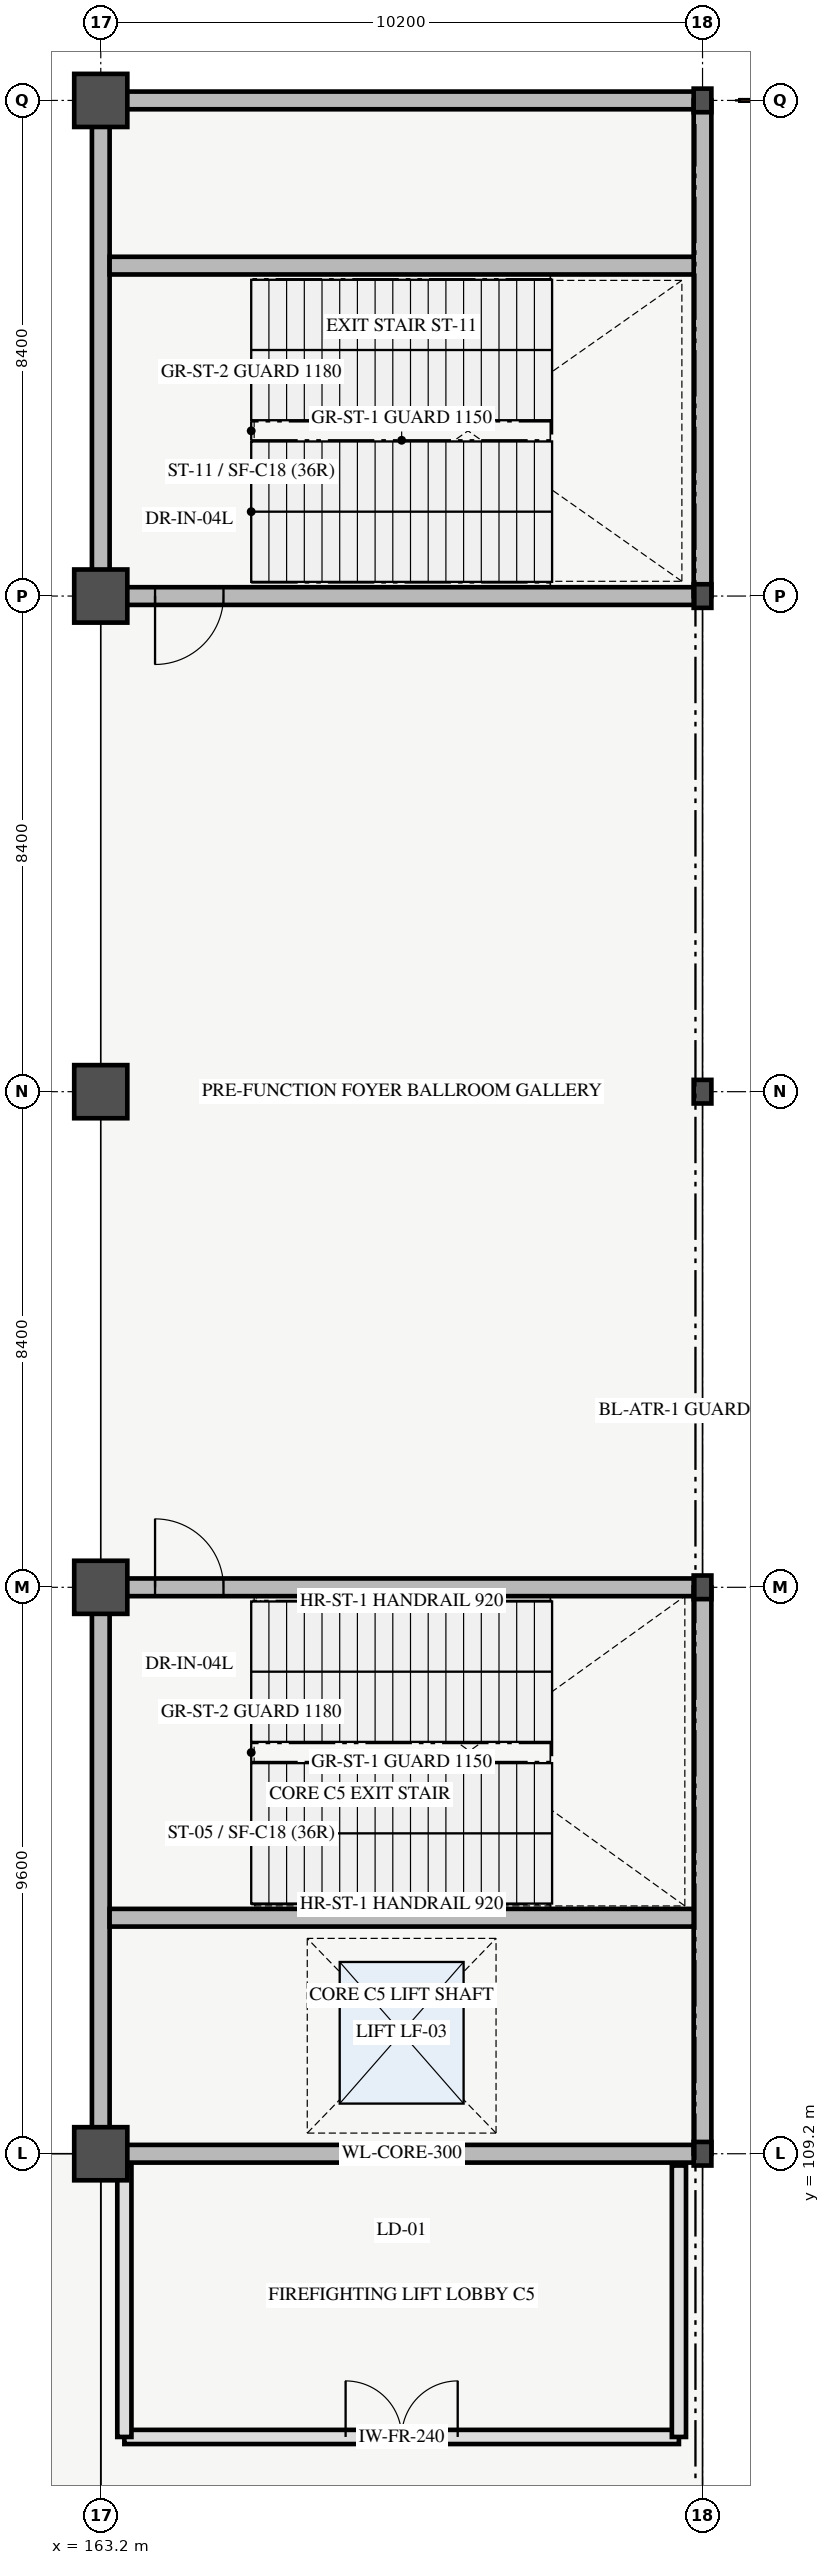
"""IFC4 building model, lengths in metres.
Left out: names, types, materials, properties, quantities, classifications, styles, units other than length and angle.
Written with IfcOpenShell. Run it as: python <this file> out.ifc"""

import sys

from ifc_helpers import new_model, si_unit, direction, frame, frame_2d, origin, origin_2d, place, context, subcontext, project, spatial, rectangle, i_section, extrude, element, fill, save


model = new_model("IFC4")
c1 = context("Model", 3, precision=1e-05, world=origin(), true_north=direction((0.0, 1.0)))
c2 = subcontext(c1, "Body", "Model", "MODEL_VIEW")
j1 = project(units=[si_unit("LENGTHUNIT", "METRE"), si_unit("PLANEANGLEUNIT", "RADIAN")], contexts=[c1])
p1 = place(None, origin())
s1 = spatial("IfcSite", under=j1, at=p1, CompositionType="ELEMENT")
p2 = place(p1, origin())
s2 = spatial("IfcBuilding", under=s1, at=p2, CompositionType="ELEMENT")
p3 = place(p2, frame((0.0, 0.0, 5.4)))
s3 = spatial("IfcBuildingStorey", under=s2, at=p3, CompositionType="ELEMENT", Elevation=5.4)
for number, where, z_axis, x_axis in (
    (1, (163.2, 109.2, 0.0), (0.0, 0.0, 1.0), (1.0, 0.0, 0.0)),
    (2, (163.2, 118.8, 0.0), (0.0, 0.0, 1.0), (1.0, 0.0, 0.0)),
    (3, (163.2, 127.2, 0.0), (0.0, 0.0, 1.0), (1.0, 0.0, 0.0)),
    (4, (163.2, 135.6, 0.0), (0.0, 0.0, 1.0), (1.0, 0.0, 0.0)),
    (5, (163.2, 144.0, 0.0), (0.0, 0.0, 1.0), (1.0, 0.0, 0.0)),
):
    element("IfcColumn", number, at=place(p3, frame(where, z_axis=z_axis, x_axis=x_axis)), inside=s3, PredefinedType="COLUMN", context=c2, shape_type="SweptSolid", body=[
        extrude(rectangle(XDim=0.9, YDim=0.9, at=origin_2d()), origin(), (0.0, 0.0, 1.0), 5.4),
    ])
for number, where, z_axis, x_axis in (
    (6, (173.4, 109.2, 0.0), (0.0, 0.0, 1.0), (1.0, 0.0, 0.0)),
    (7, (173.4, 118.8, 0.0), (0.0, 0.0, 1.0), (1.0, 0.0, 0.0)),
    (8, (173.4, 127.2, 0.0), (0.0, 0.0, 1.0), (1.0, 0.0, 0.0)),
    (9, (173.4, 135.6, 0.0), (0.0, 0.0, 1.0), (1.0, 0.0, 0.0)),
    (10, (173.4, 144.0, 0.0), (0.0, 0.0, 1.0), (1.0, 0.0, 0.0)),
):
    element("IfcColumn", number, at=place(p3, frame(where, z_axis=z_axis, x_axis=x_axis)), inside=s3, PredefinedType="COLUMN", context=c2, shape_type="SweptSolid", body=[
        extrude(i_section(OverallWidth=0.3, OverallDepth=0.4, WebThickness=0.013, FlangeThickness=0.024, FilletRadius=0.027, at=origin_2d()), origin(), (0.0, 0.0, 1.0), 5.4),
    ])
p4 = place(p3, frame((163.2, 109.2, 0.0), z_axis=(0.0, 0.0, 1.0), x_axis=(1.0, 0.0, 0.0)))
e11 = element("IfcWall", 11, at=p4, inside=s3, PredefinedType="SHEAR", context=c2, shape_type="SweptSolid", body=[
    extrude(rectangle(XDim=10.2, YDim=0.3, at=frame_2d((5.1, 0.0))), origin(), (0.0, 0.0, 1.0), 5.4),
])
p5 = place(p4, frame((4.5, 0.0, 0.0)))
e12 = element("IfcOpeningElement", 12, at=p5, cuts=e11, PredefinedType="OPENING", context=c2, shape_type="SweptSolid", body=[
    extrude(rectangle(XDim=1.2, YDim=2.25, at=frame_2d((0.6, 1.125))), frame((0.0, 0.16, 0.0), z_axis=(0.0, -1.0, 0.0), x_axis=(1.0, 0.0, 0.0)), (0.0, 0.0, 1.0), 0.32),
])
p6 = place(p3, frame((163.2, 118.8, 0.0), z_axis=(0.0, 0.0, 1.0), x_axis=(1.0, 0.0, 0.0)))
e13 = element("IfcWall", 13, at=p6, inside=s3, PredefinedType="SHEAR", context=c2, shape_type="SweptSolid", body=[
    extrude(rectangle(XDim=10.2, YDim=0.3, at=frame_2d((5.1, 0.0))), origin(), (0.0, 0.0, 1.0), 5.4),
])
p7 = place(p6, frame((0.92, 0.0, 0.0)))
e14 = element("IfcOpeningElement", 14, at=p7, cuts=e13, PredefinedType="OPENING", context=c2, shape_type="SweptSolid", body=[
    extrude(rectangle(XDim=1.16, YDim=2.2, at=frame_2d((0.58, 1.1))), frame((0.0, 0.16, 0.0), z_axis=(0.0, -1.0, 0.0), x_axis=(1.0, 0.0, 0.0)), (0.0, 0.0, 1.0), 0.32),
])
for number, where, z_axis, x_axis in (
    (15, (163.2, 109.2, 0.0), (0.0, 0.0, 1.0), (0.0, 1.0, 0.0)),
    (16, (173.4, 109.2, 0.0), (0.0, 0.0, 1.0), (0.0, 1.0, 0.0)),
):
    element("IfcWall", number, at=place(p3, frame(where, z_axis=z_axis, x_axis=x_axis)), inside=s3, PredefinedType="SHEAR", context=c2, shape_type="SweptSolid", body=[
        extrude(rectangle(XDim=9.6, YDim=0.3, at=frame_2d((4.8, 0.0))), origin(), (0.0, 0.0, 1.0), 5.4),
    ])
p8 = place(p3, frame((163.35, 113.2, 0.0), z_axis=(0.0, 0.0, 1.0), x_axis=(1.0, 0.0, 0.0)))
e17 = element("IfcWall", 17, at=p8, inside=s3, PredefinedType="SHEAR", context=c2, shape_type="SweptSolid", body=[
    extrude(rectangle(XDim=9.9, YDim=0.3, at=frame_2d((4.95, 0.0))), origin(), (0.0, 0.0, 1.0), 5.4),
])
p9 = place(p3, frame((163.2, 135.6, 0.0), z_axis=(0.0, 0.0, 1.0), x_axis=(1.0, 0.0, 0.0)))
e18 = element("IfcWall", 18, at=p9, inside=s3, PredefinedType="SHEAR", context=c2, shape_type="SweptSolid", body=[
    extrude(rectangle(XDim=10.2, YDim=0.3, at=frame_2d((5.1, 0.0))), origin(), (0.0, 0.0, 1.0), 5.4),
])
p10 = place(p9, frame((0.92, 0.0, 0.0)))
e19 = element("IfcOpeningElement", 19, at=p10, cuts=e18, PredefinedType="OPENING", context=c2, shape_type="SweptSolid", body=[
    extrude(rectangle(XDim=1.16, YDim=2.2, at=frame_2d((0.58, 1.1))), frame((0.0, 0.16, 0.0), z_axis=(0.0, -1.0, 0.0), x_axis=(1.0, 0.0, 0.0)), (0.0, 0.0, 1.0), 0.32),
])
p11 = place(p3, frame((163.2, 144.0, 0.0), z_axis=(0.0, 0.0, 1.0), x_axis=(1.0, 0.0, 0.0)))
e20 = element("IfcWall", 20, at=p11, inside=s3, PredefinedType="SHEAR", context=c2, shape_type="SweptSolid", body=[
    extrude(rectangle(XDim=10.2, YDim=0.3, at=frame_2d((5.1, 0.0))), origin(), (0.0, 0.0, 1.0), 5.4),
])
for number, where, z_axis, x_axis in (
    (21, (163.2, 135.6, 0.0), (0.0, 0.0, 1.0), (0.0, 1.0, 0.0)),
    (22, (173.4, 135.6, 0.0), (0.0, 0.0, 1.0), (0.0, 1.0, 0.0)),
):
    element("IfcWall", number, at=place(p3, frame(where, z_axis=z_axis, x_axis=x_axis)), inside=s3, PredefinedType="SHEAR", context=c2, shape_type="SweptSolid", body=[
        extrude(rectangle(XDim=8.4, YDim=0.3, at=frame_2d((4.2, 0.0))), origin(), (0.0, 0.0, 1.0), 5.4),
    ])
p12 = place(p3, frame((163.35, 141.2, 0.0), z_axis=(0.0, 0.0, 1.0), x_axis=(1.0, 0.0, 0.0)))
e23 = element("IfcWall", 23, at=p12, inside=s3, PredefinedType="SHEAR", context=c2, shape_type="SweptSolid", body=[
    extrude(rectangle(XDim=9.9, YDim=0.3, at=frame_2d((4.95, 0.0))), origin(), (0.0, 0.0, 1.0), 5.4),
])
p13 = place(p3, frame((163.6, 104.4, 0.0), z_axis=(0.0, 0.0, 1.0), x_axis=(1.0, 0.0, 0.0)))
e24 = element("IfcWall", 24, at=p13, inside=s3, PredefinedType="PARTITIONING", context=c2, shape_type="SweptSolid", body=[
    extrude(rectangle(XDim=9.4, YDim=0.24, at=frame_2d((4.7, 0.0))), origin(), (0.0, 0.0, 1.0), 4.2),
])
p14 = place(p13, frame((3.75, 0.0, 0.0)))
e25 = element("IfcOpeningElement", 25, at=p14, cuts=e24, PredefinedType="OPENING", context=c2, shape_type="SweptSolid", body=[
    extrude(rectangle(XDim=1.9, YDim=2.25, at=frame_2d((0.95, 1.125))), frame((0.0, 0.13, 0.0), z_axis=(0.0, -1.0, 0.0), x_axis=(1.0, 0.0, 0.0)), (0.0, 0.0, 1.0), 0.26),
])
for number, where, z_axis, x_axis in (
    (26, (163.6, 104.4, 0.0), (0.0, 0.0, 1.0), (0.0, 1.0, 0.0)),
    (27, (173.0, 104.4, 0.0), (0.0, 0.0, 1.0), (0.0, 1.0, 0.0)),
):
    element("IfcWall", number, at=place(p3, frame(where, z_axis=z_axis, x_axis=x_axis)), inside=s3, PredefinedType="PARTITIONING", context=c2, shape_type="SweptSolid", body=[
        extrude(rectangle(XDim=4.6, YDim=0.24, at=frame_2d((2.3, 0.0))), origin(), (0.0, 0.0, 1.0), 4.2),
    ])
p15 = place(p7, origin())
e28 = element("IfcDoor", 28, at=p15, inside=s3, OperationType="SINGLE_SWING_LEFT", PredefinedType="DOOR", context=c2, shape_type="SweptSolid", body=[
    extrude(rectangle(XDim=1.16, YDim=2.2, at=frame_2d((0.58, 1.1))), frame((0.0, 0.025, 0.0), z_axis=(0.0, -1.0, 0.0), x_axis=(1.0, 0.0, 0.0)), (0.0, 0.0, 1.0), 0.05),
])
fill(e14, e28)
p16 = place(p5, origin())
e29 = element("IfcDoor", 29, at=p16, inside=s3, OperationType="SLIDING_TO_LEFT", PredefinedType="DOOR", context=c2, shape_type="SweptSolid", body=[
    extrude(rectangle(XDim=1.2, YDim=2.25, at=frame_2d((0.6, 1.125))), frame((0.0, 0.025, 0.0), z_axis=(0.0, -1.0, 0.0), x_axis=(1.0, 0.0, 0.0)), (0.0, 0.0, 1.0), 0.05),
])
fill(e12, e29)
p17 = place(p10, origin())
e30 = element("IfcDoor", 30, at=p17, inside=s3, OperationType="SINGLE_SWING_LEFT", PredefinedType="DOOR", context=c2, shape_type="SweptSolid", body=[
    extrude(rectangle(XDim=1.16, YDim=2.2, at=frame_2d((0.58, 1.1))), frame((0.0, 0.025, 0.0), z_axis=(0.0, -1.0, 0.0), x_axis=(1.0, 0.0, 0.0)), (0.0, 0.0, 1.0), 0.05),
])
fill(e19, e30)
p18 = place(p14, origin())
e31 = element("IfcDoor", 31, at=p18, inside=s3, OperationType="DOUBLE_DOOR_SINGLE_SWING", PredefinedType="DOOR", context=c2, shape_type="SweptSolid", body=[
    extrude(rectangle(XDim=1.9, YDim=2.25, at=frame_2d((0.95, 1.125))), frame((0.0, 0.025, 0.0), z_axis=(0.0, -1.0, 0.0), x_axis=(1.0, 0.0, 0.0)), (0.0, 0.0, 1.0), 0.05),
])
fill(e25, e31)
save(model, sys.argv[1])
